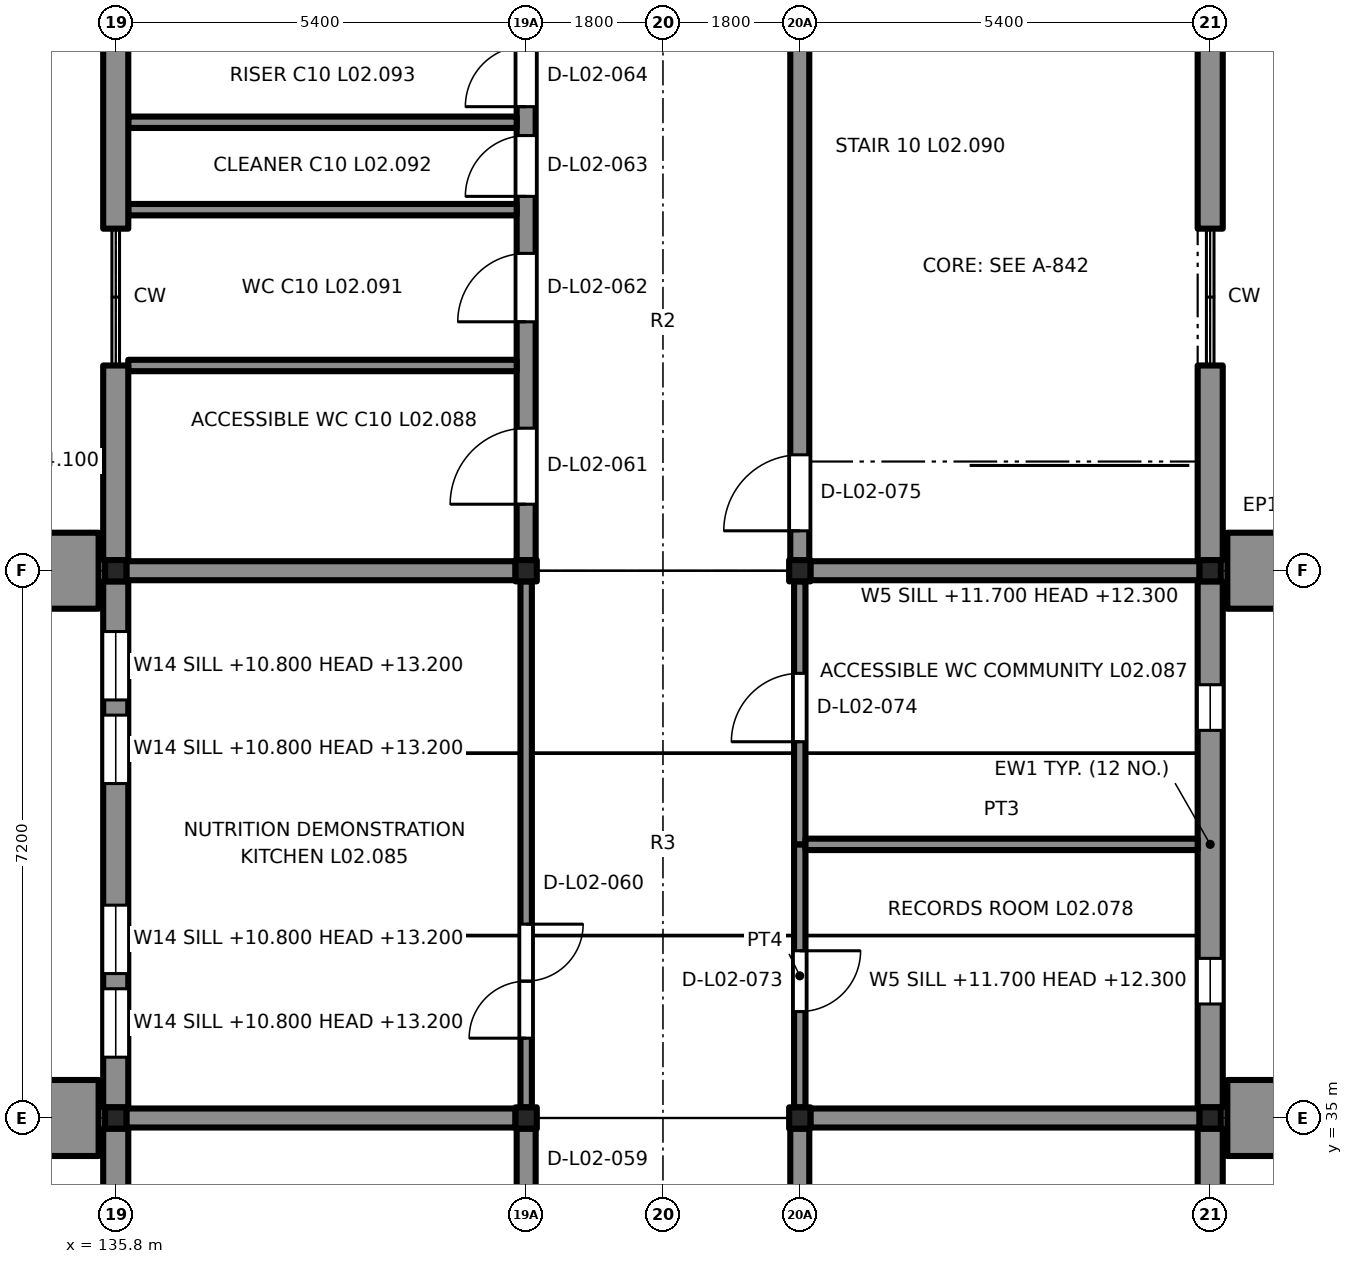
"""IFC4 building model, lengths in metres.
Left out: names, types, materials, properties, quantities, classifications, styles, units other than length and angle.
Written with IfcOpenShell. Run it as: python <this file> out.ifc"""

import sys

from ifc_helpers import new_model, si_unit, direction, frame, frame_2d, origin, origin_2d, place, context, subcontext, project, spatial, rectangle, extrude, element, fill, save


model = new_model("IFC4")
c1 = context("Model", 3, precision=1e-05, world=origin(), true_north=direction((0.0, 1.0)))
c2 = subcontext(c1, "Body", "Model", "MODEL_VIEW")
j1 = project(units=[si_unit("LENGTHUNIT", "METRE"), si_unit("PLANEANGLEUNIT", "RADIAN")], contexts=[c1])
p1 = place(None, origin())
s1 = spatial("IfcSite", under=j1, at=p1, CompositionType="ELEMENT")
p2 = place(p1, origin())
s2 = spatial("IfcBuilding", under=s1, at=p2, CompositionType="ELEMENT")
p3 = place(p2, frame((0.0, 0.0, 10.2)))
s3 = spatial("IfcBuildingStorey", under=s2, at=p3, CompositionType="ELEMENT", Elevation=10.2)
for number, where, z_axis, x_axis in (
    (1, (135.8, 35.0, 0.0), (0.0, 0.0, 1.0), (1.0, 0.0, 0.0)),
    (2, (141.2, 35.0, 0.0), (0.0, 0.0, 1.0), (1.0, 0.0, 0.0)),
    (3, (144.8, 35.0, 0.0), (0.0, 0.0, 1.0), (1.0, 0.0, 0.0)),
    (4, (150.2, 35.0, 0.0), (0.0, 0.0, 1.0), (1.0, 0.0, 0.0)),
    (5, (135.8, 42.2, 0.0), (0.0, 0.0, 1.0), (1.0, 0.0, 0.0)),
    (6, (141.2, 42.2, 0.0), (0.0, 0.0, 1.0), (1.0, 0.0, 0.0)),
    (7, (144.8, 42.2, 0.0), (0.0, 0.0, 1.0), (1.0, 0.0, 0.0)),
    (8, (150.2, 42.2, 0.0), (0.0, 0.0, 1.0), (1.0, 0.0, 0.0)),
):
    element("IfcColumn", number, at=place(p3, frame(where, z_axis=z_axis, x_axis=x_axis)), inside=s3, PredefinedType="COLUMN", context=c2, shape_type="SweptSolid", body=[
        extrude(rectangle(XDim=0.28, YDim=0.28, at=origin_2d()), origin(), (0.0, 0.0, 1.0), 3.9),
    ])
p4 = place(p3, frame((144.8, 27.94, 0.0), z_axis=(0.0, 0.0, 1.0), x_axis=(0.0, 1.0, 0.0)))
e9 = element("IfcWall", 9, at=p4, inside=s3, PredefinedType="SHEAR", context=c2, shape_type="SweptSolid", body=[
    extrude(rectangle(XDim=6.92, YDim=0.25, at=frame_2d((3.46, 0.0))), origin(), (0.0, 0.0, 1.0), 3.2),
])
p5 = place(p4, frame((0.335, 0.0, 0.0)))
e10 = element("IfcOpeningElement", 10, at=p5, cuts=e9, PredefinedType="OPENING", context=c2, shape_type="SweptSolid", body=[
    extrude(rectangle(XDim=1.0, YDim=2.1, at=frame_2d((0.5, 1.05))), frame((0.0, 0.135, 0.0), z_axis=(0.0, -1.0, 0.0), x_axis=(1.0, 0.0, 0.0)), (0.0, 0.0, 1.0), 0.27),
])
p6 = place(p3, frame((144.94, 35.0, 0.0), z_axis=(0.0, 0.0, 1.0), x_axis=(1.0, 0.0, 0.0)))
e11 = element("IfcWall", 11, at=p6, inside=s3, PredefinedType="SHEAR", context=c2, shape_type="SweptSolid", body=[
    extrude(rectangle(XDim=5.12, YDim=0.25, at=frame_2d((2.56, 0.0))), origin(), (0.0, 0.0, 1.0), 3.2),
])
p7 = place(p3, frame((141.2, 27.94, 0.0), z_axis=(0.0, 0.0, 1.0), x_axis=(0.0, 1.0, 0.0)))
e12 = element("IfcWall", 12, at=p7, inside=s3, PredefinedType="SHEAR", context=c2, shape_type="SweptSolid", body=[
    extrude(rectangle(XDim=6.92, YDim=0.25, at=frame_2d((3.46, 0.0))), origin(), (0.0, 0.0, 1.0), 3.2),
])
p8 = place(p7, frame((4.16, 0.0, 0.0)))
e13 = element("IfcOpeningElement", 13, at=p8, cuts=e12, PredefinedType="OPENING", context=c2, shape_type="SweptSolid", body=[
    extrude(rectangle(XDim=1.8, YDim=2.1, at=frame_2d((0.9, 1.05))), frame((0.0, 0.135, 0.0), z_axis=(0.0, -1.0, 0.0), x_axis=(1.0, 0.0, 0.0)), (0.0, 0.0, 1.0), 0.27),
])
p9 = place(p3, frame((135.94, 35.0, 0.0), z_axis=(0.0, 0.0, 1.0), x_axis=(1.0, 0.0, 0.0)))
e14 = element("IfcWall", 14, at=p9, inside=s3, PredefinedType="SHEAR", context=c2, shape_type="SweptSolid", body=[
    extrude(rectangle(XDim=5.12, YDim=0.25, at=frame_2d((2.56, 0.0))), origin(), (0.0, 0.0, 1.0), 3.2),
])
p10 = place(p3, frame((144.8, 42.34, 0.0), z_axis=(0.0, 0.0, 1.0), x_axis=(0.0, 1.0, 0.0)))
e15 = element("IfcWall", 15, at=p10, inside=s3, PredefinedType="SHEAR", context=c2, shape_type="SweptSolid", body=[
    extrude(rectangle(XDim=6.895, YDim=0.25, at=frame_2d((3.448, 0.0))), origin(), (0.0, 0.0, 1.0), 3.2),
])
p11 = place(p10, frame((0.385, 0.0, 0.0)))
e16 = element("IfcOpeningElement", 16, at=p11, cuts=e15, PredefinedType="OPENING", context=c2, shape_type="SweptSolid", body=[
    extrude(rectangle(XDim=1.0, YDim=2.1, at=frame_2d((0.5, 1.05))), frame((0.0, 0.135, 0.0), z_axis=(0.0, -1.0, 0.0), x_axis=(1.0, 0.0, 0.0)), (0.0, 0.0, 1.0), 0.27),
])
p12 = place(p3, frame((144.94, 42.2, 0.0), z_axis=(0.0, 0.0, 1.0), x_axis=(1.0, 0.0, 0.0)))
e17 = element("IfcWall", 17, at=p12, inside=s3, PredefinedType="SHEAR", context=c2, shape_type="SweptSolid", body=[
    extrude(rectangle(XDim=5.12, YDim=0.25, at=frame_2d((2.56, 0.0))), origin(), (0.0, 0.0, 1.0), 3.2),
])
p13 = place(p3, frame((141.2, 42.34, 0.0), z_axis=(0.0, 0.0, 1.0), x_axis=(0.0, 1.0, 0.0)))
e18 = element("IfcWall", 18, at=p13, inside=s3, PredefinedType="SHEAR", context=c2, shape_type="SweptSolid", body=[
    extrude(rectangle(XDim=6.895, YDim=0.25, at=frame_2d((3.448, 0.0))), origin(), (0.0, 0.0, 1.0), 3.2),
])
p14 = place(p13, frame((0.735, 0.0, 0.0)))
e19 = element("IfcOpeningElement", 19, at=p14, cuts=e18, PredefinedType="OPENING", context=c2, shape_type="SweptSolid", body=[
    extrude(rectangle(XDim=1.0, YDim=2.1, at=frame_2d((0.5, 1.05))), frame((0.0, 0.135, 0.0), z_axis=(0.0, -1.0, 0.0), x_axis=(1.0, 0.0, 0.0)), (0.0, 0.0, 1.0), 0.27),
])
p15 = place(p13, frame((3.135, 0.0, 0.0)))
e20 = element("IfcOpeningElement", 20, at=p15, cuts=e18, PredefinedType="OPENING", context=c2, shape_type="SweptSolid", body=[
    extrude(rectangle(XDim=0.9, YDim=2.1, at=frame_2d((0.45, 1.05))), frame((0.0, 0.135, 0.0), z_axis=(0.0, -1.0, 0.0), x_axis=(1.0, 0.0, 0.0)), (0.0, 0.0, 1.0), 0.27),
])
p16 = place(p13, frame((4.785, 0.0, 0.0)))
e21 = element("IfcOpeningElement", 21, at=p16, cuts=e18, PredefinedType="OPENING", context=c2, shape_type="SweptSolid", body=[
    extrude(rectangle(XDim=0.8, YDim=2.1, at=frame_2d((0.4, 1.05))), frame((0.0, 0.135, 0.0), z_axis=(0.0, -1.0, 0.0), x_axis=(1.0, 0.0, 0.0)), (0.0, 0.0, 1.0), 0.27),
])
p17 = place(p13, frame((5.965, 0.0, 0.0)))
e22 = element("IfcOpeningElement", 22, at=p17, cuts=e18, PredefinedType="OPENING", context=c2, shape_type="SweptSolid", body=[
    extrude(rectangle(XDim=0.8, YDim=2.1, at=frame_2d((0.4, 1.05))), frame((0.0, 0.135, 0.0), z_axis=(0.0, -1.0, 0.0), x_axis=(1.0, 0.0, 0.0)), (0.0, 0.0, 1.0), 0.27),
])
p18 = place(p3, frame((135.94, 42.2, 0.0), z_axis=(0.0, 0.0, 1.0), x_axis=(1.0, 0.0, 0.0)))
e23 = element("IfcWall", 23, at=p18, inside=s3, PredefinedType="SHEAR", context=c2, shape_type="SweptSolid", body=[
    extrude(rectangle(XDim=5.12, YDim=0.25, at=frame_2d((2.56, 0.0))), origin(), (0.0, 0.0, 1.0), 3.2),
])
for number, where, z_axis, x_axis in (
    (24, (135.965, 44.9, 0.0), (0.0, 0.0, 1.0), (1.0, 0.0, 0.0)),
    (25, (135.965, 46.95, 0.0), (0.0, 0.0, 1.0), (1.0, 0.0, 0.0)),
    (26, (135.965, 48.1, 0.0), (0.0, 0.0, 1.0), (1.0, 0.0, 0.0)),
):
    element("IfcWall", number, at=place(p3, frame(where, z_axis=z_axis, x_axis=x_axis)), inside=s3, PredefinedType="PARTITIONING", context=c2, shape_type="SweptSolid", body=[
        extrude(rectangle(XDim=5.11, YDim=0.15, at=frame_2d((2.555, 0.0))), origin(), (0.0, 0.0, 1.0), 3.2),
    ])
p19 = place(p3, frame((135.8, 27.94, 0.0), z_axis=(0.0, 0.0, 1.0), x_axis=(0.0, 1.0, 0.0)))
e27 = element("IfcWall", 27, at=p19, inside=s3, PredefinedType="SOLIDWALL", context=c2, shape_type="SweptSolid", body=[
    extrude(rectangle(XDim=6.92, YDim=0.33, at=frame_2d((3.46, 0.0))), origin(), (0.0, 0.0, 1.0), 3.2),
])
p20 = place(p3, frame((135.8, 35.14, 0.0), z_axis=(0.0, 0.0, 1.0), x_axis=(0.0, 1.0, 0.0)))
e28 = element("IfcWall", 28, at=p20, inside=s3, PredefinedType="SOLIDWALL", context=c2, shape_type="SweptSolid", body=[
    extrude(rectangle(XDim=6.92, YDim=0.33, at=frame_2d((3.46, 0.0))), origin(), (0.0, 0.0, 1.0), 3.2),
])
p21 = place(p20, frame((0.66, 0.0, 0.6)))
e29 = element("IfcOpeningElement", 29, at=p21, cuts=e28, PredefinedType="OPENING", context=c2, shape_type="SweptSolid", body=[
    extrude(rectangle(XDim=0.9, YDim=2.4, at=frame_2d((0.45, 1.2))), frame((0.0, 0.175, 0.0), z_axis=(0.0, -1.0, 0.0), x_axis=(1.0, 0.0, 0.0)), (0.0, 0.0, 1.0), 0.35),
])
p22 = place(p20, frame((1.76, 0.0, 0.6)))
e30 = element("IfcOpeningElement", 30, at=p22, cuts=e28, PredefinedType="OPENING", context=c2, shape_type="SweptSolid", body=[
    extrude(rectangle(XDim=0.9, YDim=2.4, at=frame_2d((0.45, 1.2))), frame((0.0, 0.175, 0.0), z_axis=(0.0, -1.0, 0.0), x_axis=(1.0, 0.0, 0.0)), (0.0, 0.0, 1.0), 0.35),
])
p23 = place(p20, frame((4.26, 0.0, 0.6)))
e31 = element("IfcOpeningElement", 31, at=p23, cuts=e28, PredefinedType="OPENING", context=c2, shape_type="SweptSolid", body=[
    extrude(rectangle(XDim=0.9, YDim=2.4, at=frame_2d((0.45, 1.2))), frame((0.0, 0.175, 0.0), z_axis=(0.0, -1.0, 0.0), x_axis=(1.0, 0.0, 0.0)), (0.0, 0.0, 1.0), 0.35),
])
p24 = place(p20, frame((5.36, 0.0, 0.6)))
e32 = element("IfcOpeningElement", 32, at=p24, cuts=e28, PredefinedType="OPENING", context=c2, shape_type="SweptSolid", body=[
    extrude(rectangle(XDim=0.9, YDim=2.4, at=frame_2d((0.45, 1.2))), frame((0.0, 0.175, 0.0), z_axis=(0.0, -1.0, 0.0), x_axis=(1.0, 0.0, 0.0)), (0.0, 0.0, 1.0), 0.35),
])
p25 = place(p3, frame((135.8, 42.34, 0.0), z_axis=(0.0, 0.0, 1.0), x_axis=(0.0, 1.0, 0.0)))
e33 = element("IfcWall", 33, at=p25, inside=s3, PredefinedType="SOLIDWALL", context=c2, shape_type="SweptSolid", body=[
    extrude(rectangle(XDim=2.56, YDim=0.33, at=frame_2d((1.28, 0.0))), origin(), (0.0, 0.0, 1.0), 3.2),
])
p26 = place(p3, frame((135.8, 46.7, 0.0), z_axis=(0.0, 0.0, 1.0), x_axis=(0.0, 1.0, 0.0)))
e34 = element("IfcWall", 34, at=p26, inside=s3, PredefinedType="SOLIDWALL", context=c2, shape_type="SweptSolid", body=[
    extrude(rectangle(XDim=2.865, YDim=0.33, at=frame_2d((1.433, 0.0))), origin(), (0.0, 0.0, 1.0), 3.2),
])
for number, where, z_axis, x_axis in (
    (35, (135.2, 34.5, 0.0), (0.0, 0.0, 1.0), (0.0, 1.0, 0.0)),
    (36, (135.2, 41.7, 0.0), (0.0, 0.0, 1.0), (0.0, 1.0, 0.0)),
):
    element("IfcWall", number, at=place(p3, frame(where, z_axis=z_axis, x_axis=x_axis)), inside=s3, PredefinedType="SOLIDWALL", context=c2, shape_type="SweptSolid", body=[
        extrude(rectangle(XDim=1.0, YDim=0.75, at=frame_2d((0.5, 0.0))), origin(), (0.0, 0.0, 1.0), 3.9),
    ])
p27 = place(p3, frame((150.2, 34.86, 0.0), z_axis=(0.0, 0.0, 1.0), x_axis=(0.0, -1.0, 0.0)))
e37 = element("IfcWall", 37, at=p27, inside=s3, PredefinedType="SOLIDWALL", context=c2, shape_type="SweptSolid", body=[
    extrude(rectangle(XDim=2.76, YDim=0.33, at=frame_2d((1.38, 0.0))), origin(), (0.0, 0.0, 1.0), 3.2),
])
p28 = place(p3, frame((150.2, 42.06, 0.0), z_axis=(0.0, 0.0, 1.0), x_axis=(0.0, -1.0, 0.0)))
e38 = element("IfcWall", 38, at=p28, inside=s3, PredefinedType="SOLIDWALL", context=c2, shape_type="SweptSolid", body=[
    extrude(rectangle(XDim=6.92, YDim=0.33, at=frame_2d((3.46, 0.0))), origin(), (0.0, 0.0, 1.0), 3.2),
])
p29 = place(p28, frame((4.96, 0.0, 1.5)))
e39 = element("IfcOpeningElement", 39, at=p29, cuts=e38, PredefinedType="OPENING", context=c2, shape_type="SweptSolid", body=[
    extrude(rectangle(XDim=0.6, YDim=0.6, at=frame_2d((0.3, 0.3))), frame((0.0, 0.175, 0.0), z_axis=(0.0, -1.0, 0.0), x_axis=(1.0, 0.0, 0.0)), (0.0, 0.0, 1.0), 0.35),
])
p30 = place(p28, frame((1.36, 0.0, 1.5)))
e40 = element("IfcOpeningElement", 40, at=p30, cuts=e38, PredefinedType="OPENING", context=c2, shape_type="SweptSolid", body=[
    extrude(rectangle(XDim=0.6, YDim=0.6, at=frame_2d((0.3, 0.3))), frame((0.0, 0.175, 0.0), z_axis=(0.0, -1.0, 0.0), x_axis=(1.0, 0.0, 0.0)), (0.0, 0.0, 1.0), 0.35),
])
p31 = place(p3, frame((150.2, 44.9, 0.0), z_axis=(0.0, 0.0, 1.0), x_axis=(0.0, -1.0, 0.0)))
e41 = element("IfcWall", 41, at=p31, inside=s3, PredefinedType="SOLIDWALL", context=c2, shape_type="SweptSolid", body=[
    extrude(rectangle(XDim=2.56, YDim=0.33, at=frame_2d((1.28, 0.0))), origin(), (0.0, 0.0, 1.0), 3.2),
])
p32 = place(p3, frame((150.2, 49.565, 0.0), z_axis=(0.0, 0.0, 1.0), x_axis=(0.0, -1.0, 0.0)))
e42 = element("IfcWall", 42, at=p32, inside=s3, PredefinedType="SOLIDWALL", context=c2, shape_type="SweptSolid", body=[
    extrude(rectangle(XDim=2.865, YDim=0.33, at=frame_2d((1.433, 0.0))), origin(), (0.0, 0.0, 1.0), 3.2),
])
for number, where, z_axis, x_axis in (
    (43, (150.8, 35.5, 0.0), (0.0, 0.0, 1.0), (0.0, -1.0, 0.0)),
    (44, (150.8, 42.7, 0.0), (0.0, 0.0, 1.0), (0.0, -1.0, 0.0)),
):
    element("IfcWall", number, at=place(p3, frame(where, z_axis=z_axis, x_axis=x_axis)), inside=s3, PredefinedType="SOLIDWALL", context=c2, shape_type="SweptSolid", body=[
        extrude(rectangle(XDim=1.0, YDim=0.75, at=frame_2d((0.5, 0.0))), origin(), (0.0, 0.0, 1.0), 3.9),
    ])
p33 = place(p3, frame((141.2, 35.14, 0.0), z_axis=(0.0, 0.0, 1.0), x_axis=(0.0, 1.0, 0.0)))
e45 = element("IfcWall", 45, at=p33, inside=s3, PredefinedType="PARTITIONING", context=c2, shape_type="SweptSolid", body=[
    extrude(rectangle(XDim=6.92, YDim=0.15, at=frame_2d((3.46, 0.0))), origin(), (0.0, 0.0, 1.0), 4.467),
])
p34 = place(p33, frame((0.91, 0.0, 0.0)))
e46 = element("IfcOpeningElement", 46, at=p34, cuts=e45, PredefinedType="OPENING", context=c2, shape_type="SweptSolid", body=[
    extrude(rectangle(XDim=1.5, YDim=2.1, at=frame_2d((0.75, 1.05))), frame((0.0, 0.085, 0.0), z_axis=(0.0, -1.0, 0.0), x_axis=(1.0, 0.0, 0.0)), (0.0, 0.0, 1.0), 0.17),
])
p35 = place(p3, frame((144.8, 38.6, 0.0), z_axis=(0.0, 0.0, 1.0), x_axis=(0.0, -1.0, 0.0)))
e47 = element("IfcWall", 47, at=p35, inside=s3, PredefinedType="PARTITIONING", context=c2, shape_type="SweptSolid", body=[
    extrude(rectangle(XDim=3.46, YDim=0.15, at=frame_2d((1.73, 0.0))), origin(), (0.0, 0.0, 1.0), 4.467),
])
p36 = place(p35, frame((1.4, 0.0, 0.0)))
e48 = element("IfcOpeningElement", 48, at=p36, cuts=e47, PredefinedType="OPENING", context=c2, shape_type="SweptSolid", body=[
    extrude(rectangle(XDim=0.8, YDim=2.1, at=frame_2d((0.4, 1.05))), frame((0.0, 0.085, 0.0), z_axis=(0.0, -1.0, 0.0), x_axis=(1.0, 0.0, 0.0)), (0.0, 0.0, 1.0), 0.17),
])
p37 = place(p3, frame((144.8, 38.6, 0.0), z_axis=(0.0, 0.0, 1.0), x_axis=(0.0, 1.0, 0.0)))
e49 = element("IfcWall", 49, at=p37, inside=s3, PredefinedType="PARTITIONING", context=c2, shape_type="SweptSolid", body=[
    extrude(rectangle(XDim=3.46, YDim=0.15, at=frame_2d((1.73, 0.0))), origin(), (0.0, 0.0, 1.0), 4.467),
])
p38 = place(p37, frame((1.35, 0.0, 0.0)))
e50 = element("IfcOpeningElement", 50, at=p38, cuts=e49, PredefinedType="OPENING", context=c2, shape_type="SweptSolid", body=[
    extrude(rectangle(XDim=0.9, YDim=2.1, at=frame_2d((0.45, 1.05))), frame((0.0, 0.085, 0.0), z_axis=(0.0, -1.0, 0.0), x_axis=(1.0, 0.0, 0.0)), (0.0, 0.0, 1.0), 0.17),
])
p39 = place(p3, frame((150.035, 38.6, 0.0), z_axis=(0.0, 0.0, 1.0), x_axis=(-1.0, 0.0, 0.0)))
e51 = element("IfcWall", 51, at=p39, inside=s3, PredefinedType="PARTITIONING", context=c2, shape_type="SweptSolid", body=[
    extrude(rectangle(XDim=5.16, YDim=0.15, at=frame_2d((2.58, 0.0))), origin(), (0.0, 0.0, 1.0), 4.467),
])
p40 = place(p11, origin())
e52 = element("IfcDoor", 52, at=p40, inside=s3, OperationType="SINGLE_SWING_RIGHT", PredefinedType="DOOR", context=c2, shape_type="SweptSolid", body=[
    extrude(rectangle(XDim=1.0, YDim=2.1, at=frame_2d((0.5, 1.05))), frame((0.0, 0.025, 0.0), z_axis=(0.0, -1.0, 0.0), x_axis=(1.0, 0.0, 0.0)), (0.0, 0.0, 1.0), 0.05),
])
fill(e16, e52)
p41 = place(p14, origin())
e53 = element("IfcDoor", 53, at=p41, inside=s3, OperationType="SINGLE_SWING_LEFT", PredefinedType="DOOR", context=c2, shape_type="SweptSolid", body=[
    extrude(rectangle(XDim=1.0, YDim=2.1, at=frame_2d((0.5, 1.05))), frame((0.0, 0.025, 0.0), z_axis=(0.0, -1.0, 0.0), x_axis=(1.0, 0.0, 0.0)), (0.0, 0.0, 1.0), 0.05),
])
fill(e19, e53)
p42 = place(p15, origin())
e54 = element("IfcDoor", 54, at=p42, inside=s3, OperationType="SINGLE_SWING_LEFT", PredefinedType="DOOR", context=c2, shape_type="SweptSolid", body=[
    extrude(rectangle(XDim=0.9, YDim=2.1, at=frame_2d((0.45, 1.05))), frame((0.0, 0.025, 0.0), z_axis=(0.0, -1.0, 0.0), x_axis=(1.0, 0.0, 0.0)), (0.0, 0.0, 1.0), 0.05),
])
fill(e20, e54)
p43 = place(p16, origin())
e55 = element("IfcDoor", 55, at=p43, inside=s3, OperationType="SINGLE_SWING_LEFT", PredefinedType="DOOR", context=c2, shape_type="SweptSolid", body=[
    extrude(rectangle(XDim=0.8, YDim=2.1, at=frame_2d((0.4, 1.05))), frame((0.0, 0.025, 0.0), z_axis=(0.0, -1.0, 0.0), x_axis=(1.0, 0.0, 0.0)), (0.0, 0.0, 1.0), 0.05),
])
fill(e21, e55)
p44 = place(p17, origin())
e56 = element("IfcDoor", 56, at=p44, inside=s3, OperationType="SINGLE_SWING_LEFT", PredefinedType="DOOR", context=c2, shape_type="SweptSolid", body=[
    extrude(rectangle(XDim=0.8, YDim=2.1, at=frame_2d((0.4, 1.05))), frame((0.0, 0.025, 0.0), z_axis=(0.0, -1.0, 0.0), x_axis=(1.0, 0.0, 0.0)), (0.0, 0.0, 1.0), 0.05),
])
fill(e22, e56)
p45 = place(p21, origin())
e57 = element("IfcWindow", 57, at=p45, inside=s3, PartitioningType="SINGLE_PANEL", PredefinedType="WINDOW", context=c2, shape_type="SweptSolid", body=[
    extrude(rectangle(XDim=0.9, YDim=2.4, at=frame_2d((0.45, 1.2))), frame((0.0, -0.03, 0.0), z_axis=(0.0, -1.0, 0.0), x_axis=(1.0, 0.0, 0.0)), (0.0, 0.0, 1.0), 0.06),
])
fill(e29, e57)
p46 = place(p22, origin())
e58 = element("IfcWindow", 58, at=p46, inside=s3, PartitioningType="SINGLE_PANEL", PredefinedType="WINDOW", context=c2, shape_type="SweptSolid", body=[
    extrude(rectangle(XDim=0.9, YDim=2.4, at=frame_2d((0.45, 1.2))), frame((0.0, -0.03, 0.0), z_axis=(0.0, -1.0, 0.0), x_axis=(1.0, 0.0, 0.0)), (0.0, 0.0, 1.0), 0.06),
])
fill(e30, e58)
p47 = place(p23, origin())
e59 = element("IfcWindow", 59, at=p47, inside=s3, PartitioningType="SINGLE_PANEL", PredefinedType="WINDOW", context=c2, shape_type="SweptSolid", body=[
    extrude(rectangle(XDim=0.9, YDim=2.4, at=frame_2d((0.45, 1.2))), frame((0.0, -0.03, 0.0), z_axis=(0.0, -1.0, 0.0), x_axis=(1.0, 0.0, 0.0)), (0.0, 0.0, 1.0), 0.06),
])
fill(e31, e59)
p48 = place(p24, origin())
e60 = element("IfcWindow", 60, at=p48, inside=s3, PartitioningType="SINGLE_PANEL", PredefinedType="WINDOW", context=c2, shape_type="SweptSolid", body=[
    extrude(rectangle(XDim=0.9, YDim=2.4, at=frame_2d((0.45, 1.2))), frame((0.0, -0.03, 0.0), z_axis=(0.0, -1.0, 0.0), x_axis=(1.0, 0.0, 0.0)), (0.0, 0.0, 1.0), 0.06),
])
fill(e32, e60)
p49 = place(p29, origin())
e61 = element("IfcWindow", 61, at=p49, inside=s3, PartitioningType="SINGLE_PANEL", PredefinedType="WINDOW", context=c2, shape_type="SweptSolid", body=[
    extrude(rectangle(XDim=0.6, YDim=0.6, at=frame_2d((0.3, 0.3))), frame((0.0, -0.03, 0.0), z_axis=(0.0, -1.0, 0.0), x_axis=(1.0, 0.0, 0.0)), (0.0, 0.0, 1.0), 0.06),
])
fill(e39, e61)
p50 = place(p30, origin())
e62 = element("IfcWindow", 62, at=p50, inside=s3, PartitioningType="SINGLE_PANEL", PredefinedType="WINDOW", context=c2, shape_type="SweptSolid", body=[
    extrude(rectangle(XDim=0.6, YDim=0.6, at=frame_2d((0.3, 0.3))), frame((0.0, -0.03, 0.0), z_axis=(0.0, -1.0, 0.0), x_axis=(1.0, 0.0, 0.0)), (0.0, 0.0, 1.0), 0.06),
])
fill(e40, e62)
p51 = place(p34, origin())
e63 = element("IfcDoor", 63, at=p51, inside=s3, OperationType="DOUBLE_DOOR_SINGLE_SWING", PredefinedType="DOOR", context=c2, shape_type="SweptSolid", body=[
    extrude(rectangle(XDim=1.5, YDim=2.1, at=frame_2d((0.75, 1.05))), frame((0.0, 0.025, 0.0), z_axis=(0.0, -1.0, 0.0), x_axis=(1.0, 0.0, 0.0)), (0.0, 0.0, 1.0), 0.05),
])
fill(e46, e63)
p52 = place(p36, origin())
e64 = element("IfcDoor", 64, at=p52, inside=s3, OperationType="SINGLE_SWING_RIGHT", PredefinedType="DOOR", context=c2, shape_type="SweptSolid", body=[
    extrude(rectangle(XDim=0.8, YDim=2.1, at=frame_2d((0.4, 1.05))), frame((0.0, 0.025, 0.0), z_axis=(0.0, -1.0, 0.0), x_axis=(1.0, 0.0, 0.0)), (0.0, 0.0, 1.0), 0.05),
])
fill(e48, e64)
p53 = place(p38, origin())
e65 = element("IfcDoor", 65, at=p53, inside=s3, OperationType="SINGLE_SWING_RIGHT", PredefinedType="DOOR", context=c2, shape_type="SweptSolid", body=[
    extrude(rectangle(XDim=0.9, YDim=2.1, at=frame_2d((0.45, 1.05))), frame((0.0, 0.025, 0.0), z_axis=(0.0, -1.0, 0.0), x_axis=(1.0, 0.0, 0.0)), (0.0, 0.0, 1.0), 0.05),
])
fill(e50, e65)
save(model, sys.argv[1])
